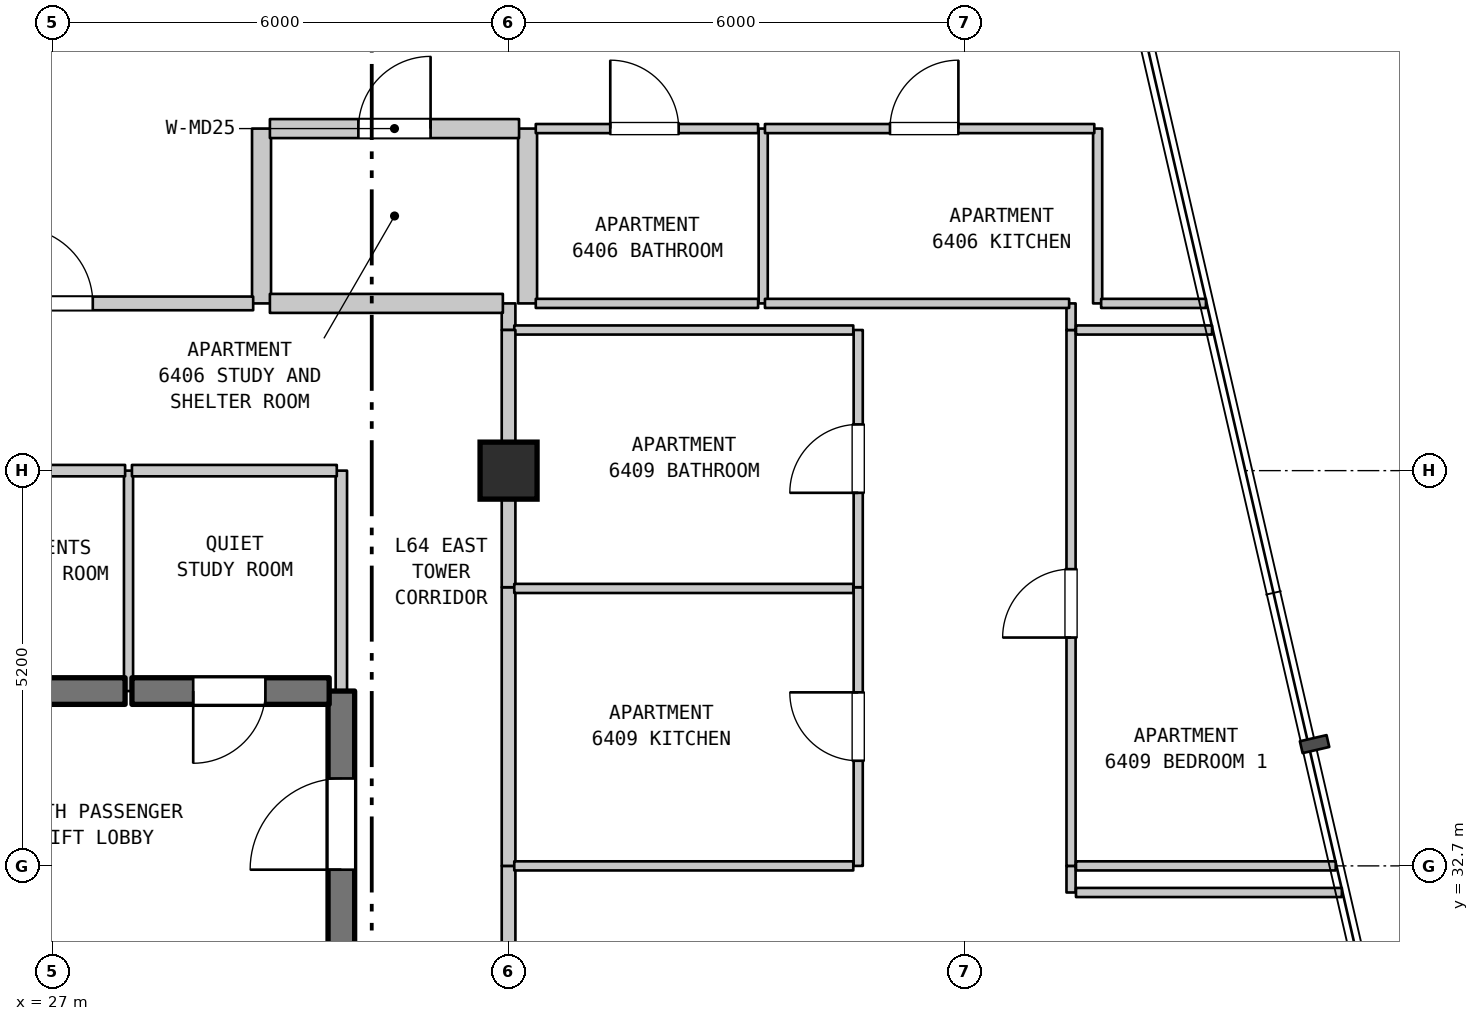
"""IFC4 building model, lengths in metres.
Left out: names, types, materials, properties, quantities, classifications, styles, units other than length and angle.
Written with IfcOpenShell. Run it as: python <this file> out.ifc"""

import sys

from ifc_helpers import new_model, si_unit, direction, frame, frame_2d, origin, origin_2d, place, context, subcontext, project, spatial, rectangle, extrude, element, fill, save


model = new_model("IFC4")
c1 = context("Model", 3, precision=1e-05, world=origin(), true_north=direction((0.0, 1.0)))
c2 = subcontext(c1, "Body", "Model", "MODEL_VIEW")
j1 = project(units=[si_unit("LENGTHUNIT", "METRE"), si_unit("PLANEANGLEUNIT", "RADIAN")], contexts=[c1])
p1 = place(None, origin())
s1 = spatial("IfcSite", under=j1, at=p1, CompositionType="ELEMENT")
p2 = place(p1, origin())
s2 = spatial("IfcBuilding", under=s1, at=p2, CompositionType="ELEMENT")
p3 = place(p2, frame((0.0, 0.0, 258.4)))
s3 = spatial("IfcBuildingStorey", under=s2, at=p3, CompositionType="ELEMENT", Elevation=258.4)
p4 = place(p3, frame((33.0, 37.9, 0.0), z_axis=(0.0, 0.0, 1.0), x_axis=(1.0, 0.0, 0.0)))
e1 = element("IfcColumn", 1, at=p4, inside=s3, PredefinedType="COLUMN", context=c2, shape_type="SweptSolid", body=[
    extrude(rectangle(XDim=0.75, YDim=0.75, at=origin_2d()), origin(), (0.0, 0.0, 1.0), 3.7),
])
p5 = place(p3, frame((28.0, 35.0, 0.0), z_axis=(0.0, 0.0, 1.0), x_axis=(0.0, 1.0, 0.0)))
e2 = element("IfcWall", 2, at=p5, inside=s3, PredefinedType="PARTITIONING", context=c2, shape_type="SweptSolid", body=[
    extrude(rectangle(XDim=2.9, YDim=0.12, at=frame_2d((1.45, 0.0))), origin(), (0.0, 0.0, 1.0), 3.39),
])
p6 = place(p3, frame((29.75, 40.1, 0.0), z_axis=(0.0, 0.0, 1.0), x_axis=(0.0, 1.0, 0.0)))
e3 = element("IfcWall", 3, at=p6, inside=s3, PredefinedType="STANDARD", context=c2, shape_type="SweptSolid", body=[
    extrude(rectangle(XDim=2.3, YDim=0.25, at=frame_2d((1.15, 0.0))), origin(), (0.0, 0.0, 1.0), 3.39),
])
p7 = place(p3, frame((30.8, 31.5, 0.0), z_axis=(0.0, 0.0, 1.0), x_axis=(0.0, 1.0, 0.0)))
e4 = element("IfcWall", 4, at=p7, inside=s3, PredefinedType="SHEAR", context=c2, shape_type="SweptSolid", body=[
    extrude(rectangle(XDim=3.5, YDim=0.35, at=frame_2d((1.75, 0.0))), origin(), (0.0, 0.0, 1.0), 3.39),
])
p8 = place(p7, frame((1.15, 0.0, 0.0)))
e5 = element("IfcOpeningElement", 5, at=p8, cuts=e4, PredefinedType="OPENING", context=c2, shape_type="SweptSolid", body=[
    extrude(rectangle(XDim=1.2, YDim=2.2, at=frame_2d((0.6, 1.1))), frame((0.0, 0.185, 0.0), z_axis=(0.0, -1.0, 0.0), x_axis=(1.0, 0.0, 0.0)), (0.0, 0.0, 1.0), 0.37),
])
p9 = place(p3, frame((30.8, 35.0, 0.0), z_axis=(0.0, 0.0, 1.0), x_axis=(0.0, 1.0, 0.0)))
e6 = element("IfcWall", 6, at=p9, inside=s3, PredefinedType="STANDARD", context=c2, shape_type="SweptSolid", body=[
    extrude(rectangle(XDim=2.9, YDim=0.15, at=frame_2d((1.45, 0.0))), origin(), (0.0, 0.0, 1.0), 3.39),
])
p10 = place(p3, frame((33.0, 29.6, 0.0), z_axis=(0.0, 0.0, 1.0), x_axis=(0.0, 1.0, 0.0)))
e7 = element("IfcWall", 7, at=p10, inside=s3, PredefinedType="STANDARD", context=c2, shape_type="SweptSolid", body=[
    extrude(rectangle(XDim=3.1, YDim=0.18, at=frame_2d((1.55, 0.0))), origin(), (0.0, 0.0, 1.0), 2.89),
])
p11 = place(p10, frame((0.978, 0.0, 0.0)))
e8 = element("IfcOpeningElement", 8, at=p11, cuts=e7, PredefinedType="OPENING", context=c2, shape_type="SweptSolid", body=[
    extrude(rectangle(XDim=1.0, YDim=2.15, at=frame_2d((0.5, 1.075))), frame((0.0, 0.1, 0.0), z_axis=(0.0, -1.0, 0.0), x_axis=(1.0, 0.0, 0.0)), (0.0, 0.0, 1.0), 0.2),
])
p12 = place(p3, frame((33.0, 32.7, 0.0), z_axis=(0.0, 0.0, 1.0), x_axis=(0.0, 1.0, 0.0)))
e9 = element("IfcWall", 9, at=p12, inside=s3, PredefinedType="STANDARD", context=c2, shape_type="SweptSolid", body=[
    extrude(rectangle(XDim=3.666, YDim=0.18, at=frame_2d((1.833, 0.0))), origin(), (0.0, 0.0, 1.0), 2.89),
])
p13 = place(p3, frame((33.0, 36.366, 0.0), z_axis=(0.0, 0.0, 1.0), x_axis=(0.0, 1.0, 0.0)))
e10 = element("IfcWall", 10, at=p13, inside=s3, PredefinedType="STANDARD", context=c2, shape_type="SweptSolid", body=[
    extrude(rectangle(XDim=1.534, YDim=0.18, at=frame_2d((0.767, 0.0))), origin(), (0.0, 0.0, 1.0), 2.89),
])
p14 = place(p3, frame((33.0, 39.75, 0.0), z_axis=(0.0, 0.0, 1.0), x_axis=(0.0, 1.0, 0.0)))
e11 = element("IfcWall", 11, at=p14, inside=s3, PredefinedType="STANDARD", context=c2, shape_type="SweptSolid", body=[
    extrude(rectangle(XDim=0.35, YDim=0.18, at=frame_2d((0.175, 0.0))), origin(), (0.0, 0.0, 1.0), 3.39),
])
p15 = place(p3, frame((33.25, 40.1, 0.0), z_axis=(0.0, 0.0, 1.0), x_axis=(0.0, 1.0, 0.0)))
e12 = element("IfcWall", 12, at=p15, inside=s3, PredefinedType="STANDARD", context=c2, shape_type="SweptSolid", body=[
    extrude(rectangle(XDim=2.3, YDim=0.25, at=frame_2d((1.15, 0.0))), origin(), (0.0, 0.0, 1.0), 3.39),
])
p16 = place(p3, frame((36.35, 40.1, 0.0), z_axis=(0.0, 0.0, 1.0), x_axis=(0.0, 1.0, 0.0)))
e13 = element("IfcWall", 13, at=p16, inside=s3, PredefinedType="PARTITIONING", context=c2, shape_type="SweptSolid", body=[
    extrude(rectangle(XDim=2.3, YDim=0.12, at=frame_2d((1.15, 0.0))), origin(), (0.0, 0.0, 1.0), 3.39),
])
p17 = place(p3, frame((37.6, 32.7, 0.0), z_axis=(0.0, 0.0, 1.0), x_axis=(0.0, 1.0, 0.0)))
e14 = element("IfcWall", 14, at=p17, inside=s3, PredefinedType="PARTITIONING", context=c2, shape_type="SweptSolid", body=[
    extrude(rectangle(XDim=3.666, YDim=0.12, at=frame_2d((1.833, 0.0))), origin(), (0.0, 0.0, 1.0), 3.39),
])
p18 = place(p17, frame((1.383, 0.0, 0.0)))
e15 = element("IfcOpeningElement", 15, at=p18, cuts=e14, PredefinedType="OPENING", context=c2, shape_type="SweptSolid", body=[
    extrude(rectangle(XDim=0.9, YDim=2.15, at=frame_2d((0.45, 1.075))), frame((0.0, 0.07, 0.0), z_axis=(0.0, -1.0, 0.0), x_axis=(1.0, 0.0, 0.0)), (0.0, 0.0, 1.0), 0.14),
])
p19 = place(p3, frame((37.6, 36.366, 0.0), z_axis=(0.0, 0.0, 1.0), x_axis=(0.0, 1.0, 0.0)))
e16 = element("IfcWall", 16, at=p19, inside=s3, PredefinedType="PARTITIONING", context=c2, shape_type="SweptSolid", body=[
    extrude(rectangle(XDim=3.384, YDim=0.12, at=frame_2d((1.692, 0.0))), origin(), (0.0, 0.0, 1.0), 3.39),
])
p20 = place(p19, frame((1.242, 0.0, 0.0)))
e17 = element("IfcOpeningElement", 17, at=p20, cuts=e16, PredefinedType="OPENING", context=c2, shape_type="SweptSolid", body=[
    extrude(rectangle(XDim=0.9, YDim=2.1, at=frame_2d((0.45, 1.05))), frame((0.0, 0.07, 0.0), z_axis=(0.0, -1.0, 0.0), x_axis=(1.0, 0.0, 0.0)), (0.0, 0.0, 1.0), 0.14),
])
p21 = place(p3, frame((40.4, 32.35, 0.0), z_axis=(0.0, 0.0, 1.0), x_axis=(0.0, 1.0, 0.0)))
e18 = element("IfcWall", 18, at=p21, inside=s3, PredefinedType="PARTITIONING", context=c2, shape_type="SweptSolid", body=[
    extrude(rectangle(XDim=0.35, YDim=0.12, at=frame_2d((0.175, 0.0))), origin(), (0.0, 0.0, 1.0), 3.39),
])
p22 = place(p3, frame((40.4, 32.7, 0.0), z_axis=(0.0, 0.0, 1.0), x_axis=(0.0, 1.0, 0.0)))
e19 = element("IfcWall", 19, at=p22, inside=s3, PredefinedType="PARTITIONING", context=c2, shape_type="SweptSolid", body=[
    extrude(rectangle(XDim=7.05, YDim=0.12, at=frame_2d((3.525, 0.0))), origin(), (0.0, 0.0, 1.0), 3.39),
])
p23 = place(p22, frame((3.004, 0.0, 0.0)))
e20 = element("IfcOpeningElement", 20, at=p23, cuts=e19, PredefinedType="OPENING", context=c2, shape_type="SweptSolid", body=[
    extrude(rectangle(XDim=0.9, YDim=2.15, at=frame_2d((0.45, 1.075))), frame((0.0, 0.07, 0.0), z_axis=(0.0, -1.0, 0.0), x_axis=(1.0, 0.0, 0.0)), (0.0, 0.0, 1.0), 0.14),
])
p24 = place(p3, frame((40.4, 39.75, 0.0), z_axis=(0.0, 0.0, 1.0), x_axis=(0.0, 1.0, 0.0)))
e21 = element("IfcWall", 21, at=p24, inside=s3, PredefinedType="PARTITIONING", context=c2, shape_type="SweptSolid", body=[
    extrude(rectangle(XDim=0.35, YDim=0.12, at=frame_2d((0.175, 0.0))), origin(), (0.0, 0.0, 1.0), 3.39),
])
p25 = place(p3, frame((40.75, 40.1, 0.0), z_axis=(0.0, 0.0, 1.0), x_axis=(0.0, 1.0, 0.0)))
e22 = element("IfcWall", 22, at=p25, inside=s3, PredefinedType="PARTITIONING", context=c2, shape_type="SweptSolid", body=[
    extrude(rectangle(XDim=2.3, YDim=0.12, at=frame_2d((1.15, 0.0))), origin(), (0.0, 0.0, 1.0), 3.39),
])
p26 = place(p3, frame((40.465, 32.35, 0.0), z_axis=(0.0, 0.0, 1.0), x_axis=(1.0, 0.0, 0.0)))
e23 = element("IfcWall", 23, at=p26, inside=s3, PredefinedType="PARTITIONING", context=c2, shape_type="SweptSolid", body=[
    extrude(rectangle(XDim=3.498, YDim=0.12, at=frame_2d((1.749, 0.0))), origin(), (0.0, 0.0, 1.0), 3.39),
])
p27 = place(p3, frame((33.075, 32.7, 0.0), z_axis=(0.0, 0.0, 1.0), x_axis=(1.0, 0.0, 0.0)))
e24 = element("IfcWall", 24, at=p27, inside=s3, PredefinedType="PARTITIONING", context=c2, shape_type="SweptSolid", body=[
    extrude(rectangle(XDim=4.46, YDim=0.12, at=frame_2d((2.23, 0.0))), origin(), (0.0, 0.0, 1.0), 3.39),
])
p28 = place(p3, frame((40.465, 32.7, 0.0), z_axis=(0.0, 0.0, 1.0), x_axis=(1.0, 0.0, 0.0)))
e25 = element("IfcWall", 25, at=p28, inside=s3, PredefinedType="PARTITIONING", context=c2, shape_type="SweptSolid", body=[
    extrude(rectangle(XDim=3.417, YDim=0.12, at=frame_2d((1.708, 0.0))), origin(), (0.0, 0.0, 1.0), 3.39),
])
p29 = place(p3, frame((23.96, 35.0, 0.0), z_axis=(0.0, 0.0, 1.0), x_axis=(1.0, 0.0, 0.0)))
e26 = element("IfcWall", 26, at=p29, inside=s3, PredefinedType="SHEAR", context=c2, shape_type="SweptSolid", body=[
    extrude(rectangle(XDim=3.995, YDim=0.35, at=frame_2d((1.998, 0.0))), origin(), (0.0, 0.0, 1.0), 3.39),
])
p30 = place(p29, frame((1.393, 0.0, 0.0)))
e27 = element("IfcOpeningElement", 27, at=p30, cuts=e26, PredefinedType="OPENING", context=c2, shape_type="SweptSolid", body=[
    extrude(rectangle(XDim=0.95, YDim=2.15, at=frame_2d((0.475, 1.075))), frame((0.0, 0.185, 0.0), z_axis=(0.0, -1.0, 0.0), x_axis=(1.0, 0.0, 0.0)), (0.0, 0.0, 1.0), 0.37),
])
p31 = place(p3, frame((28.045, 35.0, 0.0), z_axis=(0.0, 0.0, 1.0), x_axis=(1.0, 0.0, 0.0)))
e28 = element("IfcWall", 28, at=p31, inside=s3, PredefinedType="SHEAR", context=c2, shape_type="SweptSolid", body=[
    extrude(rectangle(XDim=2.595, YDim=0.35, at=frame_2d((1.297, 0.0))), origin(), (0.0, 0.0, 1.0), 3.39),
])
p32 = place(p31, frame((0.806, 0.0, 0.0)))
e29 = element("IfcOpeningElement", 29, at=p32, cuts=e28, PredefinedType="OPENING", context=c2, shape_type="SweptSolid", body=[
    extrude(rectangle(XDim=0.95, YDim=2.15, at=frame_2d((0.475, 1.075))), frame((0.0, 0.185, 0.0), z_axis=(0.0, -1.0, 0.0), x_axis=(1.0, 0.0, 0.0)), (0.0, 0.0, 1.0), 0.37),
])
p33 = place(p3, frame((33.075, 36.35, 0.0), z_axis=(0.0, 0.0, 1.0), x_axis=(1.0, 0.0, 0.0)))
e30 = element("IfcWall", 30, at=p33, inside=s3, PredefinedType="PARTITIONING", context=c2, shape_type="SweptSolid", body=[
    extrude(rectangle(XDim=4.46, YDim=0.12, at=frame_2d((2.23, 0.0))), origin(), (0.0, 0.0, 1.0), 3.39),
])
p34 = place(p3, frame((23.96, 37.9, 0.0), z_axis=(0.0, 0.0, 1.0), x_axis=(1.0, 0.0, 0.0)))
e31 = element("IfcWall", 31, at=p34, inside=s3, PredefinedType="STANDARD", context=c2, shape_type="SweptSolid", body=[
    extrude(rectangle(XDim=3.995, YDim=0.15, at=frame_2d((1.998, 0.0))), origin(), (0.0, 0.0, 1.0), 2.89),
])
p35 = place(p3, frame((28.045, 37.9, 0.0), z_axis=(0.0, 0.0, 1.0), x_axis=(1.0, 0.0, 0.0)))
e32 = element("IfcWall", 32, at=p35, inside=s3, PredefinedType="STANDARD", context=c2, shape_type="SweptSolid", body=[
    extrude(rectangle(XDim=2.695, YDim=0.15, at=frame_2d((1.348, 0.0))), origin(), (0.0, 0.0, 1.0), 2.89),
])
p36 = place(p3, frame((33.075, 39.75, 0.0), z_axis=(0.0, 0.0, 1.0), x_axis=(1.0, 0.0, 0.0)))
e33 = element("IfcWall", 33, at=p36, inside=s3, PredefinedType="PARTITIONING", context=c2, shape_type="SweptSolid", body=[
    extrude(rectangle(XDim=4.46, YDim=0.12, at=frame_2d((2.23, 0.0))), origin(), (0.0, 0.0, 1.0), 3.39),
])
p37 = place(p3, frame((40.465, 39.75, 0.0), z_axis=(0.0, 0.0, 1.0), x_axis=(1.0, 0.0, 0.0)))
e34 = element("IfcWall", 34, at=p37, inside=s3, PredefinedType="PARTITIONING", context=c2, shape_type="SweptSolid", body=[
    extrude(rectangle(XDim=1.79, YDim=0.12, at=frame_2d((0.895, 0.0))), origin(), (0.0, 0.0, 1.0), 3.39),
])
p38 = place(p3, frame((19.295, 40.1, 0.0), z_axis=(0.0, 0.0, 1.0), x_axis=(1.0, 0.0, 0.0)))
e35 = element("IfcWall", 35, at=p38, inside=s3, PredefinedType="STANDARD", context=c2, shape_type="SweptSolid", body=[
    extrude(rectangle(XDim=10.345, YDim=0.18, at=frame_2d((5.172, 0.0))), origin(), (0.0, 0.0, 1.0), 3.39),
])
p39 = place(p38, frame((2.035, 0.0, 0.0)))
e36 = element("IfcOpeningElement", 36, at=p39, cuts=e35, PredefinedType="OPENING", context=c2, shape_type="SweptSolid", body=[
    extrude(rectangle(XDim=1.0, YDim=2.15, at=frame_2d((0.5, 1.075))), frame((0.0, 0.1, 0.0), z_axis=(0.0, -1.0, 0.0), x_axis=(1.0, 0.0, 0.0)), (0.0, 0.0, 1.0), 0.2),
])
p40 = place(p38, frame((7.235, 0.0, 0.0)))
e37 = element("IfcOpeningElement", 37, at=p40, cuts=e35, PredefinedType="OPENING", context=c2, shape_type="SweptSolid", body=[
    extrude(rectangle(XDim=1.0, YDim=2.15, at=frame_2d((0.5, 1.075))), frame((0.0, 0.1, 0.0), z_axis=(0.0, -1.0, 0.0), x_axis=(1.0, 0.0, 0.0)), (0.0, 0.0, 1.0), 0.2),
])
p41 = place(p3, frame((29.86, 40.1, 0.0), z_axis=(0.0, 0.0, 1.0), x_axis=(1.0, 0.0, 0.0)))
e38 = element("IfcWall", 38, at=p41, inside=s3, PredefinedType="STANDARD", context=c2, shape_type="SweptSolid", body=[
    extrude(rectangle(XDim=3.065, YDim=0.25, at=frame_2d((1.532, 0.0))), origin(), (0.0, 0.0, 1.0), 3.39),
])
p42 = place(p3, frame((33.358, 40.1, 0.0), z_axis=(0.0, 0.0, 1.0), x_axis=(1.0, 0.0, 0.0)))
e39 = element("IfcWall", 39, at=p42, inside=s3, PredefinedType="PARTITIONING", context=c2, shape_type="SweptSolid", body=[
    extrude(rectangle(XDim=2.925, YDim=0.12, at=frame_2d((1.462, 0.0))), origin(), (0.0, 0.0, 1.0), 3.39),
])
p43 = place(p3, frame((36.373, 40.1, 0.0), z_axis=(0.0, 0.0, 1.0), x_axis=(1.0, 0.0, 0.0)))
e40 = element("IfcWall", 40, at=p43, inside=s3, PredefinedType="PARTITIONING", context=c2, shape_type="SweptSolid", body=[
    extrude(rectangle(XDim=4.002, YDim=0.12, at=frame_2d((2.001, 0.0))), origin(), (0.0, 0.0, 1.0), 3.39),
])
p44 = place(p3, frame((40.796, 40.1, 0.0), z_axis=(0.0, 0.0, 1.0), x_axis=(1.0, 0.0, 0.0)))
e41 = element("IfcWall", 41, at=p44, inside=s3, PredefinedType="PARTITIONING", context=c2, shape_type="SweptSolid", body=[
    extrude(rectangle(XDim=1.379, YDim=0.12, at=frame_2d((0.689, 0.0))), origin(), (0.0, 0.0, 1.0), 3.39),
])
p45 = place(p3, frame((29.86, 42.4, 0.0), z_axis=(0.0, 0.0, 1.0), x_axis=(1.0, 0.0, 0.0)))
e42 = element("IfcWall", 42, at=p45, inside=s3, PredefinedType="STANDARD", context=c2, shape_type="SweptSolid", body=[
    extrude(rectangle(XDim=3.278, YDim=0.25, at=frame_2d((1.639, 0.0))), origin(), (0.0, 0.0, 1.0), 3.39),
])
p46 = place(p45, frame((1.164, 0.0, 0.0)))
e43 = element("IfcOpeningElement", 43, at=p46, cuts=e42, PredefinedType="OPENING", context=c2, shape_type="SweptSolid", body=[
    extrude(rectangle(XDim=0.95, YDim=2.15, at=frame_2d((0.475, 1.075))), frame((0.0, 0.135, 0.0), z_axis=(0.0, -1.0, 0.0), x_axis=(1.0, 0.0, 0.0)), (0.0, 0.0, 1.0), 0.27),
])
p47 = place(p3, frame((33.358, 42.4, 0.0), z_axis=(0.0, 0.0, 1.0), x_axis=(1.0, 0.0, 0.0)))
e44 = element("IfcWall", 44, at=p47, inside=s3, PredefinedType="PARTITIONING", context=c2, shape_type="SweptSolid", body=[
    extrude(rectangle(XDim=2.925, YDim=0.12, at=frame_2d((1.462, 0.0))), origin(), (0.0, 0.0, 1.0), 3.39),
])
p48 = place(p47, frame((0.98, 0.0, 0.0)))
e45 = element("IfcOpeningElement", 45, at=p48, cuts=e44, PredefinedType="OPENING", context=c2, shape_type="SweptSolid", body=[
    extrude(rectangle(XDim=0.9, YDim=2.1, at=frame_2d((0.45, 1.05))), frame((0.0, 0.07, 0.0), z_axis=(0.0, -1.0, 0.0), x_axis=(1.0, 0.0, 0.0)), (0.0, 0.0, 1.0), 0.14),
])
p49 = place(p3, frame((36.373, 42.4, 0.0), z_axis=(0.0, 0.0, 1.0), x_axis=(1.0, 0.0, 0.0)))
e46 = element("IfcWall", 46, at=p49, inside=s3, PredefinedType="PARTITIONING", context=c2, shape_type="SweptSolid", body=[
    extrude(rectangle(XDim=4.333, YDim=0.12, at=frame_2d((2.167, 0.0))), origin(), (0.0, 0.0, 1.0), 3.39),
])
p50 = place(p49, frame((1.645, 0.0, 0.0)))
e47 = element("IfcOpeningElement", 47, at=p50, cuts=e46, PredefinedType="OPENING", context=c2, shape_type="SweptSolid", body=[
    extrude(rectangle(XDim=0.9, YDim=2.15, at=frame_2d((0.45, 1.075))), frame((0.0, 0.07, 0.0), z_axis=(0.0, -1.0, 0.0), x_axis=(1.0, 0.0, 0.0)), (0.0, 0.0, 1.0), 0.14),
])
p51 = place(p3, frame((33.0, 37.9, 0.0), z_axis=(0.0, 0.0, 1.0), x_axis=(0.0, 1.0, 0.0)))
e48 = element("IfcWall", 48, at=p51, inside=s3, PredefinedType="STANDARD", context=c2, shape_type="SweptSolid", body=[
    extrude(rectangle(XDim=1.85, YDim=0.18, at=frame_2d((0.925, 0.0))), origin(), (0.0, 0.0, 1.0), 2.79),
])
p52 = place(p8, origin())
e49 = element("IfcDoor", 49, at=p52, inside=s3, OperationType="SINGLE_SWING_LEFT", PredefinedType="DOOR", context=c2, shape_type="SweptSolid", body=[
    extrude(rectangle(XDim=1.2, YDim=2.2, at=frame_2d((0.6, 1.1))), frame((0.0, 0.025, 0.0), z_axis=(0.0, -1.0, 0.0), x_axis=(1.0, 0.0, 0.0)), (0.0, 0.0, 1.0), 0.05),
])
fill(e5, e49)
p53 = place(p18, origin())
e50 = element("IfcDoor", 50, at=p53, inside=s3, OperationType="SINGLE_SWING_RIGHT", PredefinedType="DOOR", context=c2, shape_type="SweptSolid", body=[
    extrude(rectangle(XDim=0.9, YDim=2.15, at=frame_2d((0.45, 1.075))), frame((0.0, 0.025, 0.0), z_axis=(0.0, -1.0, 0.0), x_axis=(1.0, 0.0, 0.0)), (0.0, 0.0, 1.0), 0.05),
])
fill(e15, e50)
p54 = place(p20, origin())
e51 = element("IfcDoor", 51, at=p54, inside=s3, OperationType="SINGLE_SWING_LEFT", PredefinedType="DOOR", context=c2, shape_type="SweptSolid", body=[
    extrude(rectangle(XDim=0.9, YDim=2.1, at=frame_2d((0.45, 1.05))), frame((0.0, 0.025, 0.0), z_axis=(0.0, -1.0, 0.0), x_axis=(1.0, 0.0, 0.0)), (0.0, 0.0, 1.0), 0.05),
])
fill(e17, e51)
p55 = place(p23, origin())
e52 = element("IfcDoor", 52, at=p55, inside=s3, OperationType="SINGLE_SWING_LEFT", PredefinedType="DOOR", context=c2, shape_type="SweptSolid", body=[
    extrude(rectangle(XDim=0.9, YDim=2.15, at=frame_2d((0.45, 1.075))), frame((0.0, 0.025, 0.0), z_axis=(0.0, -1.0, 0.0), x_axis=(1.0, 0.0, 0.0)), (0.0, 0.0, 1.0), 0.05),
])
fill(e20, e52)
p56 = place(p32, frame((0.95, 0.0, 0.0), z_axis=(0.0, 0.0, 1.0), x_axis=(-1.0, 0.0, 0.0)))
e53 = element("IfcDoor", 53, at=p56, inside=s3, OperationType="SINGLE_SWING_LEFT", PredefinedType="DOOR", context=c2, shape_type="SweptSolid", body=[
    extrude(rectangle(XDim=0.95, YDim=2.15, at=frame_2d((0.475, 1.075))), frame((0.0, 0.025, 0.0), z_axis=(0.0, -1.0, 0.0), x_axis=(1.0, 0.0, 0.0)), (0.0, 0.0, 1.0), 0.05),
])
fill(e29, e53)
p57 = place(p40, origin())
e54 = element("IfcDoor", 54, at=p57, inside=s3, OperationType="SINGLE_SWING_LEFT", PredefinedType="DOOR", context=c2, shape_type="SweptSolid", body=[
    extrude(rectangle(XDim=1.0, YDim=2.15, at=frame_2d((0.5, 1.075))), frame((0.0, 0.025, 0.0), z_axis=(0.0, -1.0, 0.0), x_axis=(1.0, 0.0, 0.0)), (0.0, 0.0, 1.0), 0.05),
])
fill(e37, e54)
p58 = place(p46, origin())
e55 = element("IfcDoor", 55, at=p58, inside=s3, OperationType="SINGLE_SWING_RIGHT", PredefinedType="DOOR", context=c2, shape_type="SweptSolid", body=[
    extrude(rectangle(XDim=0.95, YDim=2.15, at=frame_2d((0.475, 1.075))), frame((0.0, 0.025, 0.0), z_axis=(0.0, -1.0, 0.0), x_axis=(1.0, 0.0, 0.0)), (0.0, 0.0, 1.0), 0.05),
])
fill(e43, e55)
p59 = place(p48, origin())
e56 = element("IfcDoor", 56, at=p59, inside=s3, OperationType="SINGLE_SWING_LEFT", PredefinedType="DOOR", context=c2, shape_type="SweptSolid", body=[
    extrude(rectangle(XDim=0.9, YDim=2.1, at=frame_2d((0.45, 1.05))), frame((0.0, 0.025, 0.0), z_axis=(0.0, -1.0, 0.0), x_axis=(1.0, 0.0, 0.0)), (0.0, 0.0, 1.0), 0.05),
])
fill(e45, e56)
p60 = place(p50, origin())
e57 = element("IfcDoor", 57, at=p60, inside=s3, OperationType="SINGLE_SWING_RIGHT", PredefinedType="DOOR", context=c2, shape_type="SweptSolid", body=[
    extrude(rectangle(XDim=0.9, YDim=2.15, at=frame_2d((0.45, 1.075))), frame((0.0, 0.025, 0.0), z_axis=(0.0, -1.0, 0.0), x_axis=(1.0, 0.0, 0.0)), (0.0, 0.0, 1.0), 0.05),
])
fill(e47, e57)
save(model, sys.argv[1])
